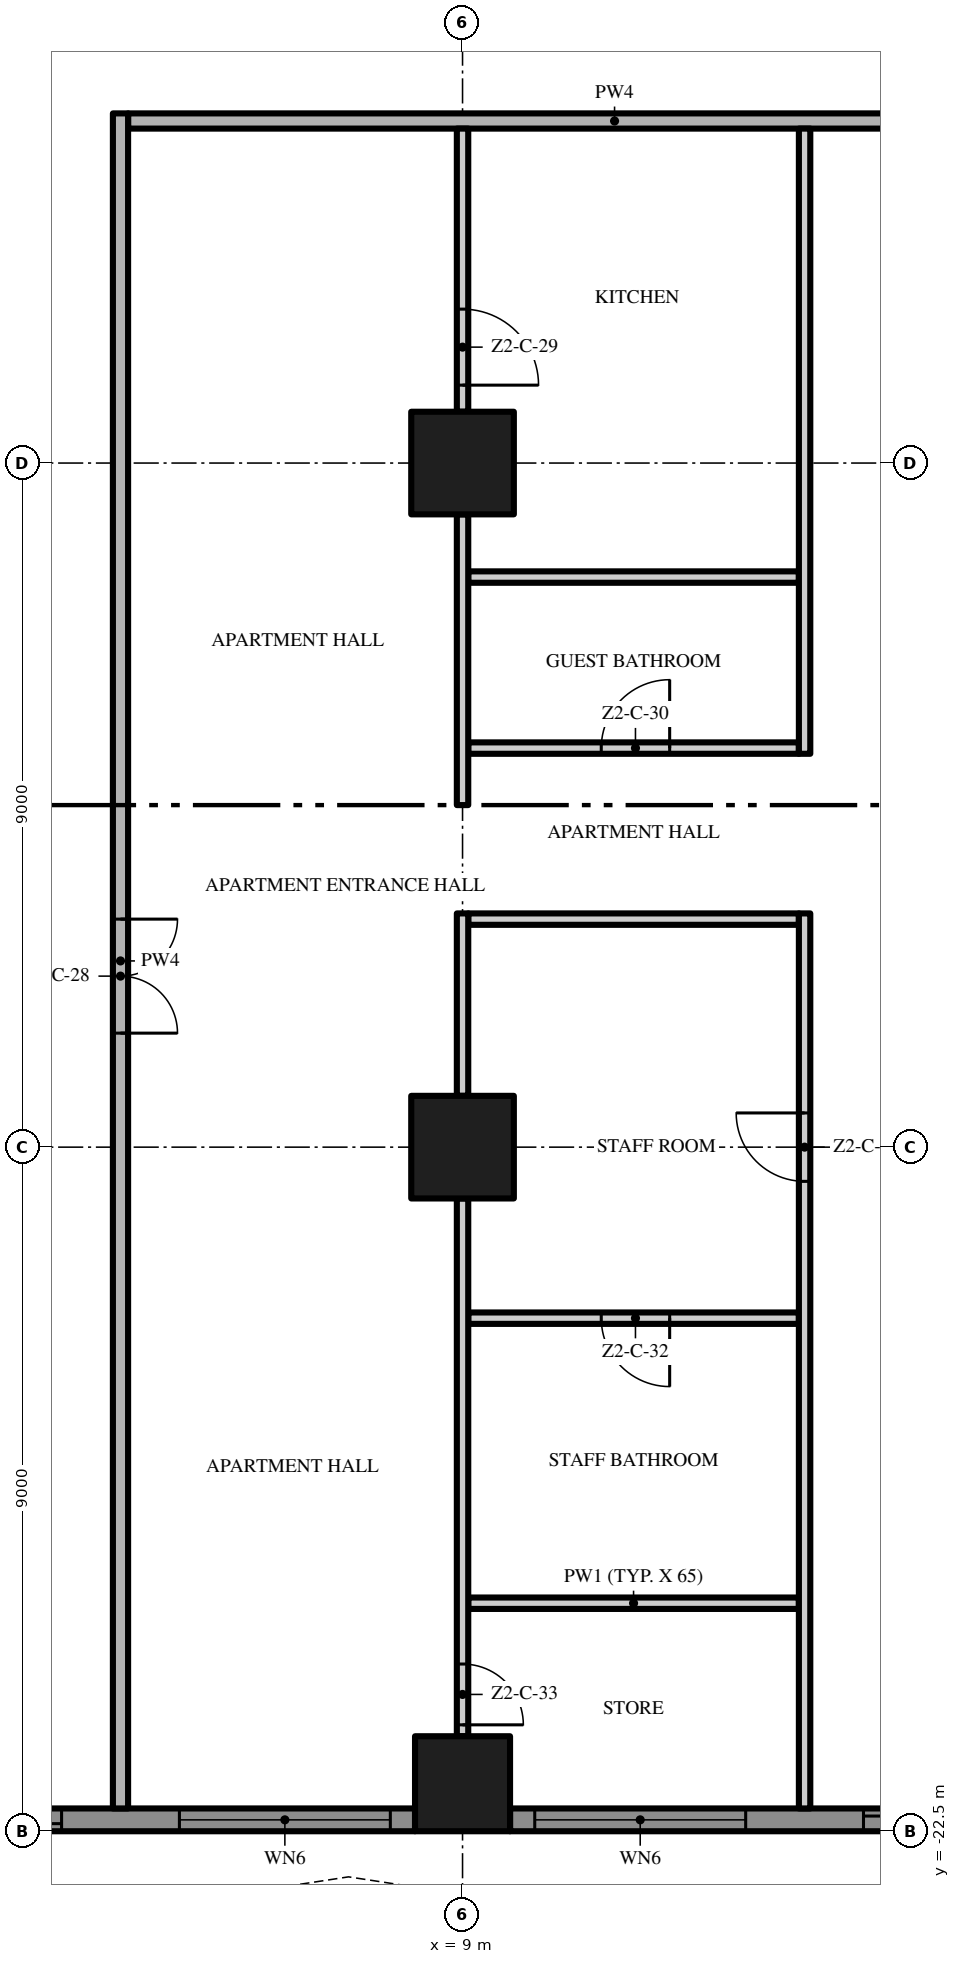
"""IFC4 building model, lengths in metres.
Left out: names, types, materials, properties, quantities, classifications, styles, units other than length and angle.
Written with IfcOpenShell. Run it as: python <this file> out.ifc"""

import sys

from ifc_helpers import new_model, si_unit, direction, frame, frame_2d, origin, origin_2d, place, context, subcontext, project, spatial, polyline, rectangle, outline, extrude, element, fill, save


model = new_model("IFC4")
c1 = context("Model", 3, precision=1e-05, world=origin(), true_north=direction((0.0, 1.0)))
c2 = subcontext(c1, "Body", "Model", "MODEL_VIEW")
j1 = project(units=[si_unit("LENGTHUNIT", "METRE"), si_unit("PLANEANGLEUNIT", "RADIAN")], contexts=[c1])
p1 = place(None, origin())
s1 = spatial("IfcSite", under=j1, at=p1, CompositionType="ELEMENT")
p2 = place(p1, origin())
s2 = spatial("IfcBuilding", under=s1, at=p2, CompositionType="ELEMENT")
p3 = place(p2, frame((0.0, 0.0, 99.8)))
s3 = spatial("IfcBuildingStorey", under=s2, at=p3, CompositionType="ELEMENT", Elevation=99.8)
p4 = place(p3, frame((9.0, -13.5, 0.0), z_axis=(0.0, 0.0, 1.0), x_axis=(1.0, 0.0, 0.0)))
e1 = element("IfcColumn", 1, at=p4, inside=s3, PredefinedType="COLUMN", context=c2, shape_type="SweptSolid", body=[
    extrude(rectangle(XDim=1.35, YDim=1.35, at=origin_2d()), origin(), (0.0, 0.0, 1.0), 3.5),
])
p5 = place(p3, frame((9.0, -21.875, 0.0), z_axis=(0.0, 0.0, 1.0), x_axis=(1.0, 0.0, 0.0)))
e2 = element("IfcColumn", 2, at=p5, inside=s3, PredefinedType="COLUMN", context=c2, shape_type="SweptSolid", body=[
    extrude(rectangle(XDim=1.25, YDim=1.25, at=origin_2d()), origin(), (0.0, 0.0, 1.0), 3.5),
])
p6 = place(p3, frame((9.0, -4.5, 0.0), z_axis=(0.0, 0.0, 1.0), x_axis=(1.0, 0.0, 0.0)))
e3 = element("IfcColumn", 3, at=p6, inside=s3, PredefinedType="COLUMN", context=c2, shape_type="SweptSolid", body=[
    extrude(rectangle(XDim=1.35, YDim=1.35, at=origin_2d()), origin(), (0.0, 0.0, 1.0), 3.5),
])
p7 = place(p3, frame((8.375, -22.35, 0.0), z_axis=(0.0, 0.0, 1.0), x_axis=(-1.0, 0.0, 0.0)))
e4 = element("IfcWall", 4, at=p7, inside=s3, PredefinedType="SOLIDWALL", context=c2, shape_type="SweptSolid", body=[
    extrude(rectangle(XDim=7.75, YDim=0.3, at=frame_2d((3.875, 0.0))), origin(), (0.0, 0.0, 1.0), 3.5),
])
p8 = place(p7, frame((4.65, 0.0, 0.0)))
e5 = element("IfcOpeningElement", 5, at=p8, cuts=e4, PredefinedType="OPENING", context=c2, shape_type="SweptSolid", body=[
    extrude(rectangle(XDim=2.775, YDim=2.4, at=frame_2d((1.387, 1.2))), frame((0.0, 0.16, 0.0), z_axis=(0.0, -1.0, 0.0), x_axis=(1.0, 0.0, 0.0)), (0.0, 0.0, 1.0), 0.32),
])
p9 = place(p7, frame((0.325, 0.0, 0.45)))
e6 = element("IfcOpeningElement", 6, at=p9, cuts=e4, PredefinedType="OPENING", context=c2, shape_type="SweptSolid", body=[
    extrude(rectangle(XDim=2.775, YDim=2.65, at=frame_2d((1.387, 1.325))), frame((0.0, 0.16, 0.0), z_axis=(0.0, -1.0, 0.0), x_axis=(1.0, 0.0, 0.0)), (0.0, 0.0, 1.0), 0.32),
])
p10 = place(p3, frame((17.375, -22.35, 0.0), z_axis=(0.0, 0.0, 1.0), x_axis=(-1.0, 0.0, 0.0)))
e7 = element("IfcWall", 7, at=p10, inside=s3, PredefinedType="SOLIDWALL", context=c2, shape_type="SweptSolid", body=[
    extrude(rectangle(XDim=7.75, YDim=0.3, at=frame_2d((3.875, 0.0))), origin(), (0.0, 0.0, 1.0), 3.5),
])
p11 = place(p10, frame((4.65, 0.0, 0.45)))
e8 = element("IfcOpeningElement", 8, at=p11, cuts=e7, PredefinedType="OPENING", context=c2, shape_type="SweptSolid", body=[
    extrude(rectangle(XDim=2.775, YDim=2.65, at=frame_2d((1.387, 1.325))), frame((0.0, 0.16, 0.0), z_axis=(0.0, -1.0, 0.0), x_axis=(1.0, 0.0, 0.0)), (0.0, 0.0, 1.0), 0.32),
])
p12 = place(p10, frame((0.325, 0.0, 0.0)))
e9 = element("IfcOpeningElement", 9, at=p12, cuts=e7, PredefinedType="OPENING", context=c2, shape_type="SweptSolid", body=[
    extrude(rectangle(XDim=2.775, YDim=2.4, at=frame_2d((1.387, 1.2))), frame((0.0, 0.16, 0.0), z_axis=(0.0, -1.0, 0.0), x_axis=(1.0, 0.0, 0.0)), (0.0, 0.0, 1.0), 0.32),
])
p13 = place(p3, origin())
e10 = element("IfcWall", 10, at=p13, inside=s3, PredefinedType="USERDEFINED", context=c2, shape_type="SweptSolid", body=[
    extrude(outline(polyline([(-22.5, -23.1), (-21.0, -23.329), (-19.5, -23.929), (-18.0, -24.671), (-16.5, -25.271), (-15.0, -25.5), (-13.5, -25.271), (-12.0, -24.671), (-10.5, -23.929), (-9.0, -23.329), (-7.5, -23.1), (-6.0, -23.329), (-4.5, -23.929), (-3.0, -24.671), (-1.5, -25.271), (0.0, -25.5), (1.5, -25.271), (3.0, -24.671), (4.5, -23.929), (6.0, -23.329), (7.5, -23.1), (9.0, -23.329), (10.5, -23.929), (12.0, -24.671), (13.5, -25.271), (15.0, -25.5), (16.5, -25.271), (18.0, -24.671), (19.5, -23.929), (21.0, -23.329), (22.5, -23.1), (22.462, -22.853), (20.934, -23.086), (19.398, -23.701), (17.898, -24.442), (16.434, -25.028), (15.0, -25.247), (13.566, -25.028), (12.102, -24.442), (10.602, -23.701), (9.066, -23.086), (7.5, -22.847), (5.934, -23.086), (4.398, -23.701), (2.898, -24.442), (1.434, -25.028), (0.0, -25.247), (-1.434, -25.028), (-2.898, -24.442), (-4.398, -23.701), (-5.934, -23.086), (-7.5, -22.847), (-9.066, -23.086), (-10.602, -23.701), (-12.102, -24.442), (-13.566, -25.028), (-15.0, -25.247), (-16.434, -25.028), (-17.898, -24.442), (-19.398, -23.701), (-20.934, -23.086), (-22.462, -22.853), (-22.5, -23.1)])), origin(), (0.0, 0.0, 1.0), 0.9),
])
p14 = place(p3, frame((9.075, -19.5, 0.0), z_axis=(0.0, 0.0, 1.0), x_axis=(1.0, 0.0, 0.0)))
e11 = element("IfcWall", 11, at=p14, inside=s3, PredefinedType="PARTITIONING", context=c2, shape_type="SweptSolid", body=[
    extrude(rectangle(XDim=4.35, YDim=0.15, at=frame_2d((2.175, 0.0))), origin(), (0.0, 0.0, 1.0), 3.5),
])
p15 = place(p3, frame((13.425, -15.75, 0.0), z_axis=(0.0, 0.0, 1.0), x_axis=(-1.0, 0.0, 0.0)))
e12 = element("IfcWall", 12, at=p15, inside=s3, PredefinedType="PARTITIONING", context=c2, shape_type="SweptSolid", body=[
    extrude(rectangle(XDim=4.35, YDim=0.15, at=frame_2d((2.175, 0.0))), origin(), (0.0, 0.0, 1.0), 3.5),
])
p16 = place(p15, frame((1.7, 0.0, 0.0)))
e13 = element("IfcOpeningElement", 13, at=p16, cuts=e12, PredefinedType="OPENING", context=c2, shape_type="SweptSolid", body=[
    extrude(rectangle(XDim=0.9, YDim=2.1, at=frame_2d((0.45, 1.05))), frame((0.0, 0.085, 0.0), z_axis=(0.0, -1.0, 0.0), x_axis=(1.0, 0.0, 0.0)), (0.0, 0.0, 1.0), 0.17),
])
p17 = place(p3, frame((9.075, -10.5, 0.0), z_axis=(0.0, 0.0, 1.0), x_axis=(1.0, 0.0, 0.0)))
e14 = element("IfcWall", 14, at=p17, inside=s3, PredefinedType="PARTITIONING", context=c2, shape_type="SweptSolid", body=[
    extrude(rectangle(XDim=4.35, YDim=0.15, at=frame_2d((2.175, 0.0))), origin(), (0.0, 0.0, 1.0), 3.5),
])
p18 = place(p3, frame((9.075, -8.25, 0.0), z_axis=(0.0, 0.0, 1.0), x_axis=(1.0, 0.0, 0.0)))
e15 = element("IfcWall", 15, at=p18, inside=s3, PredefinedType="PARTITIONING", context=c2, shape_type="SweptSolid", body=[
    extrude(rectangle(XDim=4.35, YDim=0.15, at=frame_2d((2.175, 0.0))), origin(), (0.0, 0.0, 1.0), 3.5),
])
p19 = place(p18, frame((1.75, 0.0, 0.0)))
e16 = element("IfcOpeningElement", 16, at=p19, cuts=e15, PredefinedType="OPENING", context=c2, shape_type="SweptSolid", body=[
    extrude(rectangle(XDim=0.9, YDim=2.1, at=frame_2d((0.45, 1.05))), frame((0.0, 0.085, 0.0), z_axis=(0.0, -1.0, 0.0), x_axis=(1.0, 0.0, 0.0)), (0.0, 0.0, 1.0), 0.17),
])
p20 = place(p3, frame((9.075, -6.0, 0.0), z_axis=(0.0, 0.0, 1.0), x_axis=(1.0, 0.0, 0.0)))
e17 = element("IfcWall", 17, at=p20, inside=s3, PredefinedType="PARTITIONING", context=c2, shape_type="SweptSolid", body=[
    extrude(rectangle(XDim=4.35, YDim=0.15, at=frame_2d((2.175, 0.0))), origin(), (0.0, 0.0, 1.0), 3.5),
])
p21 = place(p3, frame((4.6, 0.0, 0.0), z_axis=(0.0, 0.0, 1.0), x_axis=(1.0, 0.0, 0.0)))
e18 = element("IfcWall", 18, at=p21, inside=s3, PredefinedType="PARTITIONING", context=c2, shape_type="SweptSolid", body=[
    extrude(rectangle(XDim=12.8, YDim=0.2, at=frame_2d((6.4, 0.0))), origin(), (0.0, 0.0, 1.0), 3.5),
])
p22 = place(p3, frame((4.5, 0.1, 0.0), z_axis=(0.0, 0.0, 1.0), x_axis=(0.0, -1.0, 0.0)))
e19 = element("IfcWall", 19, at=p22, inside=s3, PredefinedType="PARTITIONING", context=c2, shape_type="SweptSolid", body=[
    extrude(rectangle(XDim=22.3, YDim=0.2, at=frame_2d((11.15, 0.0))), origin(), (0.0, 0.0, 1.0), 3.5),
])
p23 = place(p22, frame((10.6, 0.0, 0.0)))
e20 = element("IfcOpeningElement", 20, at=p23, cuts=e19, PredefinedType="OPENING", context=c2, shape_type="SweptSolid", body=[
    extrude(rectangle(XDim=1.5, YDim=2.4, at=frame_2d((0.75, 1.2))), frame((0.0, 0.11, 0.0), z_axis=(0.0, -1.0, 0.0), x_axis=(1.0, 0.0, 0.0)), (0.0, 0.0, 1.0), 0.22),
])
p24 = place(p3, frame((9.0, -14.175, 0.0), z_axis=(0.0, 0.0, 1.0), x_axis=(0.0, -1.0, 0.0)))
e21 = element("IfcWall", 21, at=p24, inside=s3, PredefinedType="PARTITIONING", context=c2, shape_type="SweptSolid", body=[
    extrude(rectangle(XDim=7.075, YDim=0.15, at=frame_2d((3.538, 0.0))), origin(), (0.0, 0.0, 1.0), 3.5),
])
p25 = place(p24, frame((6.125, 0.0, 0.0)))
e22 = element("IfcOpeningElement", 22, at=p25, cuts=e21, PredefinedType="OPENING", context=c2, shape_type="SweptSolid", body=[
    extrude(rectangle(XDim=0.8, YDim=2.0, at=frame_2d((0.4, 1.0))), frame((0.0, 0.085, 0.0), z_axis=(0.0, -1.0, 0.0), x_axis=(1.0, 0.0, 0.0)), (0.0, 0.0, 1.0), 0.17),
])
p26 = place(p3, frame((9.0, -12.825, 0.0), z_axis=(0.0, 0.0, 1.0), x_axis=(0.0, 1.0, 0.0)))
e23 = element("IfcWall", 23, at=p26, inside=s3, PredefinedType="PARTITIONING", context=c2, shape_type="SweptSolid", body=[
    extrude(rectangle(XDim=2.4, YDim=0.15, at=frame_2d((1.2, 0.0))), origin(), (0.0, 0.0, 1.0), 3.5),
])
p27 = place(p3, frame((9.0, -9.0, 0.0), z_axis=(0.0, 0.0, 1.0), x_axis=(0.0, 1.0, 0.0)))
e24 = element("IfcWall", 24, at=p27, inside=s3, PredefinedType="PARTITIONING", context=c2, shape_type="SweptSolid", body=[
    extrude(rectangle(XDim=3.825, YDim=0.15, at=frame_2d((1.913, 0.0))), origin(), (0.0, 0.0, 1.0), 3.5),
])
p28 = place(p3, frame((9.0, -0.1, 0.0), z_axis=(0.0, 0.0, 1.0), x_axis=(0.0, -1.0, 0.0)))
e25 = element("IfcWall", 25, at=p28, inside=s3, PredefinedType="PARTITIONING", context=c2, shape_type="SweptSolid", body=[
    extrude(rectangle(XDim=3.725, YDim=0.15, at=frame_2d((1.863, 0.0))), origin(), (0.0, 0.0, 1.0), 3.5),
])
p29 = place(p28, frame((2.375, 0.0, 0.0)))
e26 = element("IfcOpeningElement", 26, at=p29, cuts=e25, PredefinedType="OPENING", context=c2, shape_type="SweptSolid", body=[
    extrude(rectangle(XDim=1.0, YDim=2.4, at=frame_2d((0.5, 1.2))), frame((0.0, 0.085, 0.0), z_axis=(0.0, -1.0, 0.0), x_axis=(1.0, 0.0, 0.0)), (0.0, 0.0, 1.0), 0.17),
])
p30 = place(p3, frame((13.5, -22.2, 0.0), z_axis=(0.0, 0.0, 1.0), x_axis=(0.0, 1.0, 0.0)))
e27 = element("IfcWall", 27, at=p30, inside=s3, PredefinedType="PARTITIONING", context=c2, shape_type="SweptSolid", body=[
    extrude(rectangle(XDim=11.775, YDim=0.15, at=frame_2d((5.888, 0.0))), origin(), (0.0, 0.0, 1.0), 3.5),
])
p31 = place(p30, frame((8.25, 0.0, 0.0)))
e28 = element("IfcOpeningElement", 28, at=p31, cuts=e27, PredefinedType="OPENING", context=c2, shape_type="SweptSolid", body=[
    extrude(rectangle(XDim=0.9, YDim=2.1, at=frame_2d((0.45, 1.05))), frame((0.0, 0.085, 0.0), z_axis=(0.0, -1.0, 0.0), x_axis=(1.0, 0.0, 0.0)), (0.0, 0.0, 1.0), 0.17),
])
p32 = place(p3, frame((13.5, -8.325, 0.0), z_axis=(0.0, 0.0, 1.0), x_axis=(0.0, 1.0, 0.0)))
e29 = element("IfcWall", 29, at=p32, inside=s3, PredefinedType="PARTITIONING", context=c2, shape_type="SweptSolid", body=[
    extrude(rectangle(XDim=8.225, YDim=0.15, at=frame_2d((4.112, 0.0))), origin(), (0.0, 0.0, 1.0), 3.5),
])
p33 = place(p8, origin())
e30 = element("IfcDoor", 30, at=p33, inside=s3, OperationType="SINGLE_SWING_LEFT", PredefinedType="DOOR", context=c2, shape_type="SweptSolid", body=[
    extrude(rectangle(XDim=2.775, YDim=2.4, at=frame_2d((1.387, 1.2))), frame((0.0, 0.025, 0.0), z_axis=(0.0, -1.0, 0.0), x_axis=(1.0, 0.0, 0.0)), (0.0, 0.0, 1.0), 0.05),
])
fill(e5, e30)
p34 = place(p9, origin())
e31 = element("IfcWindow", 31, at=p34, inside=s3, PartitioningType="SINGLE_PANEL", PredefinedType="WINDOW", context=c2, shape_type="SweptSolid", body=[
    extrude(rectangle(XDim=2.775, YDim=2.65, at=frame_2d((1.387, 1.325))), frame((0.0, 0.03, 0.0), z_axis=(0.0, -1.0, 0.0), x_axis=(1.0, 0.0, 0.0)), (0.0, 0.0, 1.0), 0.06),
])
fill(e6, e31)
p35 = place(p11, origin())
e32 = element("IfcWindow", 32, at=p35, inside=s3, PartitioningType="SINGLE_PANEL", PredefinedType="WINDOW", context=c2, shape_type="SweptSolid", body=[
    extrude(rectangle(XDim=2.775, YDim=2.65, at=frame_2d((1.387, 1.325))), frame((0.0, 0.03, 0.0), z_axis=(0.0, -1.0, 0.0), x_axis=(1.0, 0.0, 0.0)), (0.0, 0.0, 1.0), 0.06),
])
fill(e8, e32)
p36 = place(p12, origin())
e33 = element("IfcDoor", 33, at=p36, inside=s3, OperationType="SINGLE_SWING_LEFT", PredefinedType="DOOR", context=c2, shape_type="SweptSolid", body=[
    extrude(rectangle(XDim=2.775, YDim=2.4, at=frame_2d((1.387, 1.2))), frame((0.0, 0.025, 0.0), z_axis=(0.0, -1.0, 0.0), x_axis=(1.0, 0.0, 0.0)), (0.0, 0.0, 1.0), 0.05),
])
fill(e9, e33)
p37 = place(p23, origin())
e34 = element("IfcDoor", 34, at=p37, inside=s3, OperationType="DOUBLE_DOOR_SINGLE_SWING", PredefinedType="DOOR", context=c2, shape_type="SweptSolid", body=[
    extrude(rectangle(XDim=1.5, YDim=2.4, at=frame_2d((0.75, 1.2))), frame((0.0, 0.025, 0.0), z_axis=(0.0, -1.0, 0.0), x_axis=(1.0, 0.0, 0.0)), (0.0, 0.0, 1.0), 0.05),
])
fill(e20, e34)
p38 = place(p29, origin())
e35 = element("IfcDoor", 35, at=p38, inside=s3, OperationType="SINGLE_SWING_RIGHT", PredefinedType="DOOR", context=c2, shape_type="SweptSolid", body=[
    extrude(rectangle(XDim=1.0, YDim=2.4, at=frame_2d((0.5, 1.2))), frame((0.0, 0.025, 0.0), z_axis=(0.0, -1.0, 0.0), x_axis=(1.0, 0.0, 0.0)), (0.0, 0.0, 1.0), 0.05),
])
fill(e26, e35)
p39 = place(p19, origin())
e36 = element("IfcDoor", 36, at=p39, inside=s3, OperationType="SINGLE_SWING_RIGHT", PredefinedType="DOOR", context=c2, shape_type="SweptSolid", body=[
    extrude(rectangle(XDim=0.9, YDim=2.1, at=frame_2d((0.45, 1.05))), frame((0.0, 0.025, 0.0), z_axis=(0.0, -1.0, 0.0), x_axis=(1.0, 0.0, 0.0)), (0.0, 0.0, 1.0), 0.05),
])
fill(e16, e36)
p40 = place(p31, origin())
e37 = element("IfcDoor", 37, at=p40, inside=s3, OperationType="SINGLE_SWING_RIGHT", PredefinedType="DOOR", context=c2, shape_type="SweptSolid", body=[
    extrude(rectangle(XDim=0.9, YDim=2.1, at=frame_2d((0.45, 1.05))), frame((0.0, 0.025, 0.0), z_axis=(0.0, -1.0, 0.0), x_axis=(1.0, 0.0, 0.0)), (0.0, 0.0, 1.0), 0.05),
])
fill(e28, e37)
p41 = place(p16, origin())
e38 = element("IfcDoor", 38, at=p41, inside=s3, OperationType="SINGLE_SWING_LEFT", PredefinedType="DOOR", context=c2, shape_type="SweptSolid", body=[
    extrude(rectangle(XDim=0.9, YDim=2.1, at=frame_2d((0.45, 1.05))), frame((0.0, 0.025, 0.0), z_axis=(0.0, -1.0, 0.0), x_axis=(1.0, 0.0, 0.0)), (0.0, 0.0, 1.0), 0.05),
])
fill(e13, e38)
p42 = place(p25, origin())
e39 = element("IfcDoor", 39, at=p42, inside=s3, OperationType="SINGLE_SWING_RIGHT", PredefinedType="DOOR", context=c2, shape_type="SweptSolid", body=[
    extrude(rectangle(XDim=0.8, YDim=2.0, at=frame_2d((0.4, 1.0))), frame((0.0, 0.025, 0.0), z_axis=(0.0, -1.0, 0.0), x_axis=(1.0, 0.0, 0.0)), (0.0, 0.0, 1.0), 0.05),
])
fill(e22, e39)
save(model, sys.argv[1])
